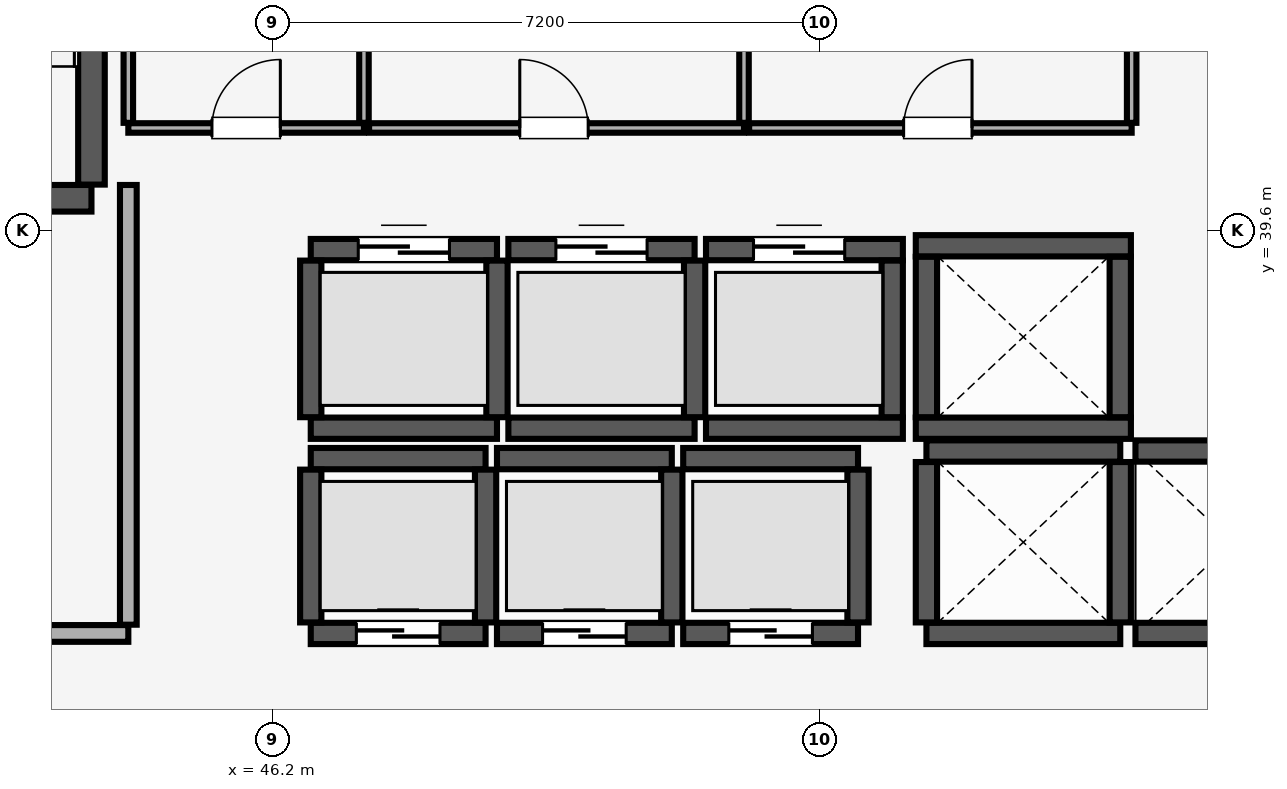
"""IFC4 building model, lengths in metres.
Left out: names, types, materials, properties, quantities, classifications, styles, units other than length and angle.
Written with IfcOpenShell. Run it as: python <this file> out.ifc"""

import sys

from ifc_helpers import new_model, si_unit, direction, frame, frame_2d, origin, place, context, subcontext, project, spatial, rectangle, extrude, element, fill, save


model = new_model("IFC4")
c1 = context("Model", 3, precision=1e-05, world=origin(), true_north=direction((0.0, 1.0)))
c2 = subcontext(c1, "Body", "Model", "MODEL_VIEW")
j1 = project(units=[si_unit("LENGTHUNIT", "METRE"), si_unit("PLANEANGLEUNIT", "RADIAN")], contexts=[c1])
p1 = place(None, origin())
s1 = spatial("IfcSite", under=j1, at=p1, CompositionType="ELEMENT")
p2 = place(p1, origin())
s2 = spatial("IfcBuilding", under=s1, at=p2, CompositionType="ELEMENT")
p3 = place(p2, frame((0.0, 0.0, 130.55)))
s3 = spatial("IfcBuildingStorey", under=s2, at=p3, CompositionType="ELEMENT", Elevation=130.55)
p4 = place(p3, frame((40.185, 40.025, 0.0), z_axis=(0.0, 0.0, 1.0), x_axis=(1.0, 0.0, 0.0)))
e1 = element("IfcWall", 1, at=p4, inside=s3, PredefinedType="SHEAR", context=c2, shape_type="SweptSolid", body=[
    extrude(rectangle(XDim=3.63, YDim=0.35, at=frame_2d((1.815, 0.0))), origin(), (0.0, 0.0, 1.0), 4.52),
])
p5 = place(p4, frame((1.24, 0.0, 0.0)))
e2 = element("IfcOpeningElement", 2, at=p5, cuts=e1, PredefinedType="OPENING", context=c2, shape_type="SweptSolid", body=[
    extrude(rectangle(XDim=1.15, YDim=2.15, at=frame_2d((0.575, 1.075))), frame((0.0, 0.185, 0.0), z_axis=(0.0, -1.0, 0.0), x_axis=(1.0, 0.0, 0.0)), (0.0, 0.0, 1.0), 0.37),
])
p6 = place(p3, frame((43.815, 40.205, 0.0), z_axis=(0.0, 0.0, 1.0), x_axis=(0.0, 1.0, 0.0)))
e3 = element("IfcWall", 3, at=p6, inside=s3, PredefinedType="SHEAR", context=c2, shape_type="SweptSolid", body=[
    extrude(rectangle(XDim=8.09, YDim=0.35, at=frame_2d((4.045, 0.0))), origin(), (0.0, 0.0, 1.0), 4.52),
])
p7 = place(p3, frame((46.7, 34.3, 0.0), z_axis=(0.0, 0.0, 1.0), x_axis=(1.0, 0.0, 0.0)))
e4 = element("IfcWall", 4, at=p7, inside=s3, PredefinedType="SHEAR", context=c2, shape_type="SweptSolid", body=[
    extrude(rectangle(XDim=2.3, YDim=0.28, at=frame_2d((1.15, 0.0))), origin(), (0.0, 0.0, 1.0), 4.52),
])
p8 = place(p7, frame((0.6, 0.0, 0.0)))
e5 = element("IfcOpeningElement", 5, at=p8, cuts=e4, PredefinedType="OPENING", context=c2, shape_type="SweptSolid", body=[
    extrude(rectangle(XDim=1.1, YDim=2.2, at=frame_2d((0.55, 1.1))), frame((0.0, 0.15, 0.0), z_axis=(0.0, -1.0, 0.0), x_axis=(1.0, 0.0, 0.0)), (0.0, 0.0, 1.0), 0.3),
])
p9 = place(p3, frame((46.7, 36.6, 0.0), z_axis=(0.0, 0.0, 1.0), x_axis=(1.0, 0.0, 0.0)))
e6 = element("IfcWall", 6, at=p9, inside=s3, PredefinedType="SHEAR", context=c2, shape_type="SweptSolid", body=[
    extrude(rectangle(XDim=2.3, YDim=0.28, at=frame_2d((1.15, 0.0))), origin(), (0.0, 0.0, 1.0), 4.52),
])
for number, where, z_axis, x_axis in (
    (7, (46.7, 34.445, 0.0), (0.0, 0.0, 1.0), (0.0, 1.0, 0.0)),
    (8, (49.0, 34.445, 0.0), (0.0, 0.0, 1.0), (0.0, 1.0, 0.0)),
):
    element("IfcWall", number, at=place(p3, frame(where, z_axis=z_axis, x_axis=x_axis)), inside=s3, PredefinedType="SHEAR", context=c2, shape_type="SweptSolid", body=[
        extrude(rectangle(XDim=2.01, YDim=0.28, at=frame_2d((1.005, 0.0))), origin(), (0.0, 0.0, 1.0), 4.52),
    ])
p10 = place(p3, frame((49.15, 34.3, 0.0), z_axis=(0.0, 0.0, 1.0), x_axis=(1.0, 0.0, 0.0)))
e9 = element("IfcWall", 9, at=p10, inside=s3, PredefinedType="SHEAR", context=c2, shape_type="SweptSolid", body=[
    extrude(rectangle(XDim=2.3, YDim=0.28, at=frame_2d((1.15, 0.0))), origin(), (0.0, 0.0, 1.0), 4.52),
])
p11 = place(p10, frame((0.6, 0.0, 0.0)))
e10 = element("IfcOpeningElement", 10, at=p11, cuts=e9, PredefinedType="OPENING", context=c2, shape_type="SweptSolid", body=[
    extrude(rectangle(XDim=1.1, YDim=2.2, at=frame_2d((0.55, 1.1))), frame((0.0, 0.15, 0.0), z_axis=(0.0, -1.0, 0.0), x_axis=(1.0, 0.0, 0.0)), (0.0, 0.0, 1.0), 0.3),
])
p12 = place(p3, frame((49.15, 36.6, 0.0), z_axis=(0.0, 0.0, 1.0), x_axis=(1.0, 0.0, 0.0)))
e11 = element("IfcWall", 11, at=p12, inside=s3, PredefinedType="SHEAR", context=c2, shape_type="SweptSolid", body=[
    extrude(rectangle(XDim=2.3, YDim=0.28, at=frame_2d((1.15, 0.0))), origin(), (0.0, 0.0, 1.0), 4.52),
])
p13 = place(p3, frame((51.45, 34.445, 0.0), z_axis=(0.0, 0.0, 1.0), x_axis=(0.0, 1.0, 0.0)))
e12 = element("IfcWall", 12, at=p13, inside=s3, PredefinedType="SHEAR", context=c2, shape_type="SweptSolid", body=[
    extrude(rectangle(XDim=2.01, YDim=0.28, at=frame_2d((1.005, 0.0))), origin(), (0.0, 0.0, 1.0), 4.52),
])
p14 = place(p3, frame((51.6, 34.3, 0.0), z_axis=(0.0, 0.0, 1.0), x_axis=(1.0, 0.0, 0.0)))
e13 = element("IfcWall", 13, at=p14, inside=s3, PredefinedType="SHEAR", context=c2, shape_type="SweptSolid", body=[
    extrude(rectangle(XDim=2.3, YDim=0.28, at=frame_2d((1.15, 0.0))), origin(), (0.0, 0.0, 1.0), 4.52),
])
p15 = place(p14, frame((0.6, 0.0, 0.0)))
e14 = element("IfcOpeningElement", 14, at=p15, cuts=e13, PredefinedType="OPENING", context=c2, shape_type="SweptSolid", body=[
    extrude(rectangle(XDim=1.1, YDim=2.2, at=frame_2d((0.55, 1.1))), frame((0.0, 0.15, 0.0), z_axis=(0.0, -1.0, 0.0), x_axis=(1.0, 0.0, 0.0)), (0.0, 0.0, 1.0), 0.3),
])
p16 = place(p3, frame((51.6, 36.6, 0.0), z_axis=(0.0, 0.0, 1.0), x_axis=(1.0, 0.0, 0.0)))
e15 = element("IfcWall", 15, at=p16, inside=s3, PredefinedType="SHEAR", context=c2, shape_type="SweptSolid", body=[
    extrude(rectangle(XDim=2.3, YDim=0.28, at=frame_2d((1.15, 0.0))), origin(), (0.0, 0.0, 1.0), 4.52),
])
p17 = place(p3, frame((53.9, 34.445, 0.0), z_axis=(0.0, 0.0, 1.0), x_axis=(0.0, 1.0, 0.0)))
e16 = element("IfcWall", 16, at=p17, inside=s3, PredefinedType="SHEAR", context=c2, shape_type="SweptSolid", body=[
    extrude(rectangle(XDim=2.01, YDim=0.28, at=frame_2d((1.005, 0.0))), origin(), (0.0, 0.0, 1.0), 4.52),
])
p18 = place(p3, frame((46.7, 37.0, 0.0), z_axis=(0.0, 0.0, 1.0), x_axis=(1.0, 0.0, 0.0)))
e17 = element("IfcWall", 17, at=p18, inside=s3, PredefinedType="SHEAR", context=c2, shape_type="SweptSolid", body=[
    extrude(rectangle(XDim=2.45, YDim=0.28, at=frame_2d((1.225, 0.0))), origin(), (0.0, 0.0, 1.0), 4.52),
])
p19 = place(p3, frame((46.7, 39.35, 0.0), z_axis=(0.0, 0.0, 1.0), x_axis=(1.0, 0.0, 0.0)))
e18 = element("IfcWall", 18, at=p19, inside=s3, PredefinedType="SHEAR", context=c2, shape_type="SweptSolid", body=[
    extrude(rectangle(XDim=2.45, YDim=0.28, at=frame_2d((1.225, 0.0))), origin(), (0.0, 0.0, 1.0), 4.52),
])
p20 = place(p19, frame((0.625, 0.0, 0.0)))
e19 = element("IfcOpeningElement", 19, at=p20, cuts=e18, PredefinedType="OPENING", context=c2, shape_type="SweptSolid", body=[
    extrude(rectangle(XDim=1.2, YDim=2.25, at=frame_2d((0.6, 1.125))), frame((0.0, 0.15, 0.0), z_axis=(0.0, -1.0, 0.0), x_axis=(1.0, 0.0, 0.0)), (0.0, 0.0, 1.0), 0.3),
])
for number, where, z_axis, x_axis in (
    (20, (46.7, 37.145, 0.0), (0.0, 0.0, 1.0), (0.0, 1.0, 0.0)),
    (21, (49.15, 37.145, 0.0), (0.0, 0.0, 1.0), (0.0, 1.0, 0.0)),
):
    element("IfcWall", number, at=place(p3, frame(where, z_axis=z_axis, x_axis=x_axis)), inside=s3, PredefinedType="SHEAR", context=c2, shape_type="SweptSolid", body=[
        extrude(rectangle(XDim=2.06, YDim=0.28, at=frame_2d((1.03, 0.0))), origin(), (0.0, 0.0, 1.0), 4.52),
    ])
p21 = place(p3, frame((49.3, 37.0, 0.0), z_axis=(0.0, 0.0, 1.0), x_axis=(1.0, 0.0, 0.0)))
e22 = element("IfcWall", 22, at=p21, inside=s3, PredefinedType="SHEAR", context=c2, shape_type="SweptSolid", body=[
    extrude(rectangle(XDim=2.45, YDim=0.28, at=frame_2d((1.225, 0.0))), origin(), (0.0, 0.0, 1.0), 4.52),
])
p22 = place(p3, frame((49.3, 39.35, 0.0), z_axis=(0.0, 0.0, 1.0), x_axis=(1.0, 0.0, 0.0)))
e23 = element("IfcWall", 23, at=p22, inside=s3, PredefinedType="SHEAR", context=c2, shape_type="SweptSolid", body=[
    extrude(rectangle(XDim=2.45, YDim=0.28, at=frame_2d((1.225, 0.0))), origin(), (0.0, 0.0, 1.0), 4.52),
])
p23 = place(p22, frame((0.625, 0.0, 0.0)))
e24 = element("IfcOpeningElement", 24, at=p23, cuts=e23, PredefinedType="OPENING", context=c2, shape_type="SweptSolid", body=[
    extrude(rectangle(XDim=1.2, YDim=2.25, at=frame_2d((0.6, 1.125))), frame((0.0, 0.15, 0.0), z_axis=(0.0, -1.0, 0.0), x_axis=(1.0, 0.0, 0.0)), (0.0, 0.0, 1.0), 0.3),
])
p24 = place(p3, frame((51.75, 37.145, 0.0), z_axis=(0.0, 0.0, 1.0), x_axis=(0.0, 1.0, 0.0)))
e25 = element("IfcWall", 25, at=p24, inside=s3, PredefinedType="SHEAR", context=c2, shape_type="SweptSolid", body=[
    extrude(rectangle(XDim=2.06, YDim=0.28, at=frame_2d((1.03, 0.0))), origin(), (0.0, 0.0, 1.0), 4.52),
])
p25 = place(p3, frame((51.9, 37.0, 0.0), z_axis=(0.0, 0.0, 1.0), x_axis=(1.0, 0.0, 0.0)))
e26 = element("IfcWall", 26, at=p25, inside=s3, PredefinedType="SHEAR", context=c2, shape_type="SweptSolid", body=[
    extrude(rectangle(XDim=2.59, YDim=0.28, at=frame_2d((1.295, 0.0))), origin(), (0.0, 0.0, 1.0), 4.52),
])
p26 = place(p3, frame((51.9, 39.35, 0.0), z_axis=(0.0, 0.0, 1.0), x_axis=(1.0, 0.0, 0.0)))
e27 = element("IfcWall", 27, at=p26, inside=s3, PredefinedType="SHEAR", context=c2, shape_type="SweptSolid", body=[
    extrude(rectangle(XDim=2.59, YDim=0.28, at=frame_2d((1.295, 0.0))), origin(), (0.0, 0.0, 1.0), 4.52),
])
p27 = place(p26, frame((0.625, 0.0, 0.0)))
e28 = element("IfcOpeningElement", 28, at=p27, cuts=e27, PredefinedType="OPENING", context=c2, shape_type="SweptSolid", body=[
    extrude(rectangle(XDim=1.2, YDim=2.25, at=frame_2d((0.6, 1.125))), frame((0.0, 0.15, 0.0), z_axis=(0.0, -1.0, 0.0), x_axis=(1.0, 0.0, 0.0)), (0.0, 0.0, 1.0), 0.3),
])
p28 = place(p3, frame((54.35, 37.145, 0.0), z_axis=(0.0, 0.0, 1.0), x_axis=(0.0, 1.0, 0.0)))
e29 = element("IfcWall", 29, at=p28, inside=s3, PredefinedType="SHEAR", context=c2, shape_type="SweptSolid", body=[
    extrude(rectangle(XDim=2.06, YDim=0.28, at=frame_2d((1.03, 0.0))), origin(), (0.0, 0.0, 1.0), 4.52),
])
for number, where, z_axis, x_axis in (
    (30, (54.8, 34.3, 0.0), (0.0, 0.0, 1.0), (1.0, 0.0, 0.0)),
    (31, (54.8, 36.7, 0.0), (0.0, 0.0, 1.0), (1.0, 0.0, 0.0)),
):
    element("IfcWall", number, at=place(p3, frame(where, z_axis=z_axis, x_axis=x_axis)), inside=s3, PredefinedType="SHEAR", context=c2, shape_type="SweptSolid", body=[
        extrude(rectangle(XDim=2.55, YDim=0.28, at=frame_2d((1.275, 0.0))), origin(), (0.0, 0.0, 1.0), 4.52),
    ])
for number, where, z_axis, x_axis in (
    (32, (54.8, 34.445, 0.0), (0.0, 0.0, 1.0), (0.0, 1.0, 0.0)),
    (33, (57.35, 34.445, 0.0), (0.0, 0.0, 1.0), (0.0, 1.0, 0.0)),
):
    element("IfcWall", number, at=place(p3, frame(where, z_axis=z_axis, x_axis=x_axis)), inside=s3, PredefinedType="SHEAR", context=c2, shape_type="SweptSolid", body=[
        extrude(rectangle(XDim=2.11, YDim=0.28, at=frame_2d((1.055, 0.0))), origin(), (0.0, 0.0, 1.0), 4.52),
    ])
for number, where, z_axis, x_axis in (
    (34, (57.55, 34.3, 0.0), (0.0, 0.0, 1.0), (1.0, 0.0, 0.0)),
    (35, (57.55, 36.7, 0.0), (0.0, 0.0, 1.0), (1.0, 0.0, 0.0)),
):
    element("IfcWall", number, at=place(p3, frame(where, z_axis=z_axis, x_axis=x_axis)), inside=s3, PredefinedType="SHEAR", context=c2, shape_type="SweptSolid", body=[
        extrude(rectangle(XDim=2.55, YDim=0.28, at=frame_2d((1.275, 0.0))), origin(), (0.0, 0.0, 1.0), 4.52),
    ])
for number, where, z_axis, x_axis in (
    (36, (54.66, 37.0, 0.0), (0.0, 0.0, 1.0), (1.0, 0.0, 0.0)),
    (37, (54.66, 39.4, 0.0), (0.0, 0.0, 1.0), (1.0, 0.0, 0.0)),
):
    element("IfcWall", number, at=place(p3, frame(where, z_axis=z_axis, x_axis=x_axis)), inside=s3, PredefinedType="SHEAR", context=c2, shape_type="SweptSolid", body=[
        extrude(rectangle(XDim=2.83, YDim=0.28, at=frame_2d((1.415, 0.0))), origin(), (0.0, 0.0, 1.0), 4.52),
    ])
for number, where, z_axis, x_axis in (
    (38, (54.8, 37.145, 0.0), (0.0, 0.0, 1.0), (0.0, 1.0, 0.0)),
    (39, (57.35, 37.145, 0.0), (0.0, 0.0, 1.0), (0.0, 1.0, 0.0)),
):
    element("IfcWall", number, at=place(p3, frame(where, z_axis=z_axis, x_axis=x_axis)), inside=s3, PredefinedType="SHEAR", context=c2, shape_type="SweptSolid", body=[
        extrude(rectangle(XDim=2.11, YDim=0.28, at=frame_2d((1.055, 0.0))), origin(), (0.0, 0.0, 1.0), 4.52),
    ])
p29 = place(p3, frame((39.7, 34.3, 0.0), z_axis=(0.0, 0.0, 1.0), x_axis=(1.0, 0.0, 0.0)))
e40 = element("IfcWall", 40, at=p29, inside=s3, PredefinedType="PARTITIONING", context=c2, shape_type="SweptSolid", body=[
    extrude(rectangle(XDim=4.6, YDim=0.22, at=frame_2d((2.3, 0.0))), origin(), (0.0, 0.0, 1.0), 4.52),
])
p30 = place(p29, frame((1.7, 0.0, 0.0)))
e41 = element("IfcOpeningElement", 41, at=p30, cuts=e40, PredefinedType="OPENING", context=c2, shape_type="SweptSolid", body=[
    extrude(rectangle(XDim=1.2, YDim=2.15, at=frame_2d((0.6, 1.075))), frame((0.0, 0.12, 0.0), z_axis=(0.0, -1.0, 0.0), x_axis=(1.0, 0.0, 0.0)), (0.0, 0.0, 1.0), 0.24),
])
p31 = place(p3, frame((44.3, 34.415, 0.0), z_axis=(0.0, 0.0, 1.0), x_axis=(0.0, 1.0, 0.0)))
e42 = element("IfcWall", 42, at=p31, inside=s3, PredefinedType="PARTITIONING", context=c2, shape_type="SweptSolid", body=[
    extrude(rectangle(XDim=5.785, YDim=0.22, at=frame_2d((2.893, 0.0))), origin(), (0.0, 0.0, 1.0), 4.52),
])
p32 = place(p3, frame((44.3, 40.95, 0.0), z_axis=(0.0, 0.0, 1.0), x_axis=(1.0, 0.0, 0.0)))
e43 = element("IfcWall", 43, at=p32, inside=s3, PredefinedType="PARTITIONING", context=c2, shape_type="SweptSolid", body=[
    extrude(rectangle(XDim=3.1, YDim=0.125, at=frame_2d((1.55, 0.0))), origin(), (0.0, 0.0, 1.0), 4.52),
])
p33 = place(p32, frame((1.1, 0.0, 0.0)))
e44 = element("IfcOpeningElement", 44, at=p33, cuts=e43, PredefinedType="OPENING", context=c2, shape_type="SweptSolid", body=[
    extrude(rectangle(XDim=0.9, YDim=2.1, at=frame_2d((0.45, 1.05))), frame((0.0, 0.073, 0.0), z_axis=(0.0, -1.0, 0.0), x_axis=(1.0, 0.0, 0.0)), (0.0, 0.0, 1.0), 0.145),
])
for number, where, z_axis, x_axis in (
    (45, (44.3, 41.018, 0.0), (0.0, 0.0, 1.0), (0.0, 1.0, 0.0)),
    (46, (47.4, 41.018, 0.0), (0.0, 0.0, 1.0), (0.0, 1.0, 0.0)),
):
    element("IfcWall", number, at=place(p3, frame(where, z_axis=z_axis, x_axis=x_axis)), inside=s3, PredefinedType="PARTITIONING", context=c2, shape_type="SweptSolid", body=[
        extrude(rectangle(XDim=7.833, YDim=0.125, at=frame_2d((3.916, 0.0))), origin(), (0.0, 0.0, 1.0), 4.52),
    ])
p34 = place(p3, frame((47.468, 40.95, 0.0), z_axis=(0.0, 0.0, 1.0), x_axis=(1.0, 0.0, 0.0)))
e47 = element("IfcWall", 47, at=p34, inside=s3, PredefinedType="PARTITIONING", context=c2, shape_type="SweptSolid", body=[
    extrude(rectangle(XDim=4.932, YDim=0.125, at=frame_2d((2.466, 0.0))), origin(), (0.0, 0.0, 1.0), 4.52),
])
p35 = place(p34, frame((1.982, 0.0, 0.0)))
e48 = element("IfcOpeningElement", 48, at=p35, cuts=e47, PredefinedType="OPENING", context=c2, shape_type="SweptSolid", body=[
    extrude(rectangle(XDim=0.9, YDim=2.1, at=frame_2d((0.45, 1.05))), frame((0.0, 0.073, 0.0), z_axis=(0.0, -1.0, 0.0), x_axis=(1.0, 0.0, 0.0)), (0.0, 0.0, 1.0), 0.145),
])
p36 = place(p3, frame((52.4, 41.018, 0.0), z_axis=(0.0, 0.0, 1.0), x_axis=(0.0, 1.0, 0.0)))
e49 = element("IfcWall", 49, at=p36, inside=s3, PredefinedType="PARTITIONING", context=c2, shape_type="SweptSolid", body=[
    extrude(rectangle(XDim=7.833, YDim=0.125, at=frame_2d((3.916, 0.0))), origin(), (0.0, 0.0, 1.0), 4.52),
])
p37 = place(p3, frame((52.468, 40.95, 0.0), z_axis=(0.0, 0.0, 1.0), x_axis=(1.0, 0.0, 0.0)))
e50 = element("IfcWall", 50, at=p37, inside=s3, PredefinedType="PARTITIONING", context=c2, shape_type="SweptSolid", body=[
    extrude(rectangle(XDim=5.032, YDim=0.125, at=frame_2d((2.516, 0.0))), origin(), (0.0, 0.0, 1.0), 4.52),
])
p38 = place(p37, frame((2.032, 0.0, 0.0)))
e51 = element("IfcOpeningElement", 51, at=p38, cuts=e50, PredefinedType="OPENING", context=c2, shape_type="SweptSolid", body=[
    extrude(rectangle(XDim=0.9, YDim=2.1, at=frame_2d((0.45, 1.05))), frame((0.0, 0.073, 0.0), z_axis=(0.0, -1.0, 0.0), x_axis=(1.0, 0.0, 0.0)), (0.0, 0.0, 1.0), 0.145),
])
p39 = place(p3, frame((57.5, 41.018, 0.0), z_axis=(0.0, 0.0, 1.0), x_axis=(0.0, 1.0, 0.0)))
e52 = element("IfcWall", 52, at=p39, inside=s3, PredefinedType="PARTITIONING", context=c2, shape_type="SweptSolid", body=[
    extrude(rectangle(XDim=2.167, YDim=0.125, at=frame_2d((1.084, 0.0))), origin(), (0.0, 0.0, 1.0), 4.52),
])
p40 = place(p8, origin())
e53 = element("IfcDoor", 53, at=p40, inside=s3, OperationType="DOUBLE_DOOR_SLIDING", PredefinedType="DOOR", context=c2, shape_type="SweptSolid", body=[
    extrude(rectangle(XDim=1.1, YDim=2.2, at=frame_2d((0.55, 1.1))), frame((0.0, 0.025, 0.0), z_axis=(0.0, -1.0, 0.0), x_axis=(1.0, 0.0, 0.0)), (0.0, 0.0, 1.0), 0.05),
])
fill(e5, e53)
p41 = place(p11, origin())
e54 = element("IfcDoor", 54, at=p41, inside=s3, OperationType="DOUBLE_DOOR_SLIDING", PredefinedType="DOOR", context=c2, shape_type="SweptSolid", body=[
    extrude(rectangle(XDim=1.1, YDim=2.2, at=frame_2d((0.55, 1.1))), frame((0.0, 0.025, 0.0), z_axis=(0.0, -1.0, 0.0), x_axis=(1.0, 0.0, 0.0)), (0.0, 0.0, 1.0), 0.05),
])
fill(e10, e54)
p42 = place(p15, origin())
e55 = element("IfcDoor", 55, at=p42, inside=s3, OperationType="DOUBLE_DOOR_SLIDING", PredefinedType="DOOR", context=c2, shape_type="SweptSolid", body=[
    extrude(rectangle(XDim=1.1, YDim=2.2, at=frame_2d((0.55, 1.1))), frame((0.0, 0.025, 0.0), z_axis=(0.0, -1.0, 0.0), x_axis=(1.0, 0.0, 0.0)), (0.0, 0.0, 1.0), 0.05),
])
fill(e14, e55)
p43 = place(p20, origin())
e56 = element("IfcDoor", 56, at=p43, inside=s3, OperationType="DOUBLE_DOOR_SLIDING", PredefinedType="DOOR", context=c2, shape_type="SweptSolid", body=[
    extrude(rectangle(XDim=1.2, YDim=2.25, at=frame_2d((0.6, 1.125))), frame((0.0, 0.025, 0.0), z_axis=(0.0, -1.0, 0.0), x_axis=(1.0, 0.0, 0.0)), (0.0, 0.0, 1.0), 0.05),
])
fill(e19, e56)
p44 = place(p23, origin())
e57 = element("IfcDoor", 57, at=p44, inside=s3, OperationType="DOUBLE_DOOR_SLIDING", PredefinedType="DOOR", context=c2, shape_type="SweptSolid", body=[
    extrude(rectangle(XDim=1.2, YDim=2.25, at=frame_2d((0.6, 1.125))), frame((0.0, 0.025, 0.0), z_axis=(0.0, -1.0, 0.0), x_axis=(1.0, 0.0, 0.0)), (0.0, 0.0, 1.0), 0.05),
])
fill(e24, e57)
p45 = place(p27, origin())
e58 = element("IfcDoor", 58, at=p45, inside=s3, OperationType="DOUBLE_DOOR_SLIDING", PredefinedType="DOOR", context=c2, shape_type="SweptSolid", body=[
    extrude(rectangle(XDim=1.2, YDim=2.25, at=frame_2d((0.6, 1.125))), frame((0.0, 0.025, 0.0), z_axis=(0.0, -1.0, 0.0), x_axis=(1.0, 0.0, 0.0)), (0.0, 0.0, 1.0), 0.05),
])
fill(e28, e58)
p46 = place(p33, origin())
e59 = element("IfcDoor", 59, at=p46, inside=s3, OperationType="SINGLE_SWING_RIGHT", PredefinedType="DOOR", context=c2, shape_type="SweptSolid", body=[
    extrude(rectangle(XDim=0.9, YDim=2.1, at=frame_2d((0.45, 1.05))), frame((0.0, 0.025, 0.0), z_axis=(0.0, -1.0, 0.0), x_axis=(1.0, 0.0, 0.0)), (0.0, 0.0, 1.0), 0.05),
])
fill(e44, e59)
p47 = place(p35, origin())
e60 = element("IfcDoor", 60, at=p47, inside=s3, OperationType="SINGLE_SWING_LEFT", PredefinedType="DOOR", context=c2, shape_type="SweptSolid", body=[
    extrude(rectangle(XDim=0.9, YDim=2.1, at=frame_2d((0.45, 1.05))), frame((0.0, 0.025, 0.0), z_axis=(0.0, -1.0, 0.0), x_axis=(1.0, 0.0, 0.0)), (0.0, 0.0, 1.0), 0.05),
])
fill(e48, e60)
p48 = place(p38, origin())
e61 = element("IfcDoor", 61, at=p48, inside=s3, OperationType="SINGLE_SWING_RIGHT", PredefinedType="DOOR", context=c2, shape_type="SweptSolid", body=[
    extrude(rectangle(XDim=0.9, YDim=2.1, at=frame_2d((0.45, 1.05))), frame((0.0, 0.025, 0.0), z_axis=(0.0, -1.0, 0.0), x_axis=(1.0, 0.0, 0.0)), (0.0, 0.0, 1.0), 0.05),
])
fill(e51, e61)
save(model, sys.argv[1])
